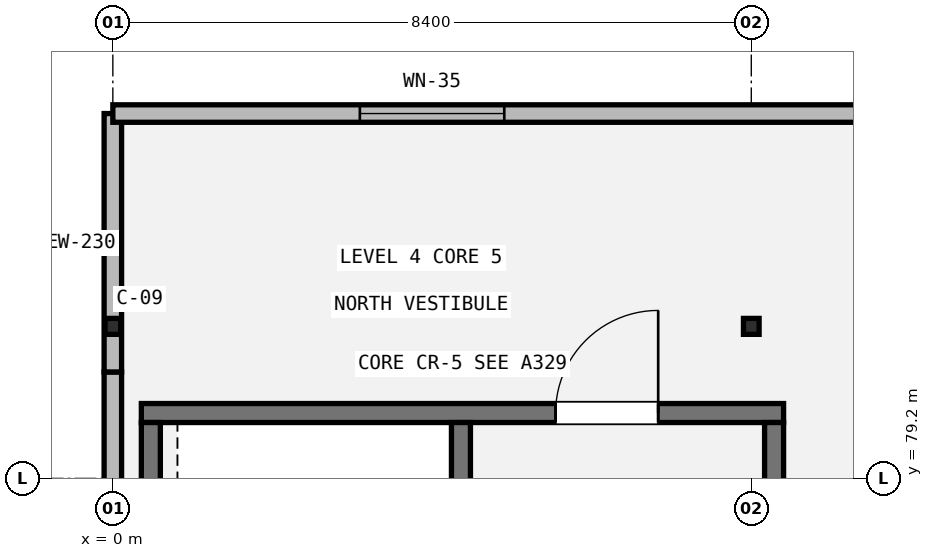
"""IFC4 building model, lengths in metres.
Left out: names, types, materials, properties, quantities, classifications, styles, units other than length and angle.
Written with IfcOpenShell. Run it as: python <this file> out.ifc"""

import sys

from ifc_helpers import new_model, si_unit, direction, frame, frame_2d, origin, origin_2d, place, context, subcontext, project, spatial, rectangle, i_section, extrude, element, fill, save


model = new_model("IFC4")
c1 = context("Model", 3, precision=1e-05, world=origin(), true_north=direction((0.0, 1.0)))
c2 = subcontext(c1, "Body", "Model", "MODEL_VIEW")
j1 = project(units=[si_unit("LENGTHUNIT", "METRE"), si_unit("PLANEANGLEUNIT", "RADIAN")], contexts=[c1])
p1 = place(None, origin())
s1 = spatial("IfcSite", under=j1, at=p1, CompositionType="ELEMENT")
p2 = place(p1, origin())
s2 = spatial("IfcBuilding", under=s1, at=p2, CompositionType="ELEMENT")
p3 = place(p2, frame((0.0, 0.0, 19.2)))
s3 = spatial("IfcBuildingStorey", under=s2, at=p3, CompositionType="ELEMENT", Elevation=19.2)
for number, where, z_axis, x_axis in (
    (1, (0.0, 81.2, 0.0), (0.0, 0.0, 1.0), (1.0, 0.0, 0.0)),
    (2, (8.4, 81.2, 0.0), (0.0, 0.0, 1.0), (1.0, 0.0, 0.0)),
):
    element("IfcColumn", number, at=place(p3, frame(where, z_axis=z_axis, x_axis=x_axis)), inside=s3, PredefinedType="COLUMN", context=c2, shape_type="SweptSolid", body=[
        extrude(i_section(OverallWidth=0.206, OverallDepth=0.21, WebThickness=0.01, FlangeThickness=0.014, FilletRadius=0.01, at=origin_2d()), origin(), (0.0, 0.0, 1.0), 4.2),
    ])
p4 = place(p3, frame((0.0, 69.6, 0.0), z_axis=(0.0, 0.0, 1.0), x_axis=(0.0, 1.0, 0.0)))
e3 = element("IfcWall", 3, at=p4, inside=s3, PredefinedType="STANDARD", context=c2, shape_type="SweptSolid", body=[
    extrude(rectangle(XDim=11.0, YDim=0.23, at=frame_2d((5.5, 0.0))), origin(), (0.0, 0.0, 1.0), 3.952),
])
p5 = place(p3, frame((0.0, 80.6, 0.0), z_axis=(0.0, 0.0, 1.0), x_axis=(0.0, 1.0, 0.0)))
e4 = element("IfcWall", 4, at=p5, inside=s3, PredefinedType="STANDARD", context=c2, shape_type="SweptSolid", body=[
    extrude(rectangle(XDim=3.4, YDim=0.23, at=frame_2d((1.7, 0.0))), origin(), (0.0, 0.0, 1.0), 3.952),
])
p6 = place(p3, frame((0.0, 84.0, 0.0), z_axis=(0.0, 0.0, 1.0), x_axis=(1.0, 0.0, 0.0)))
e5 = element("IfcWall", 5, at=p6, inside=s3, PredefinedType="STANDARD", context=c2, shape_type="SweptSolid", body=[
    extrude(rectangle(XDim=25.2, YDim=0.23, at=frame_2d((12.6, 0.0))), origin(), (0.0, 0.0, 1.0), 3.952),
])
p7 = place(p6, frame((3.25, 0.0, 0.9)))
e6 = element("IfcOpeningElement", 6, at=p7, cuts=e5, PredefinedType="OPENING", context=c2, shape_type="SweptSolid", body=[
    extrude(rectangle(XDim=1.9, YDim=1.65, at=frame_2d((0.95, 0.825))), frame((0.0, 0.125, 0.0), z_axis=(0.0, -1.0, 0.0), x_axis=(1.0, 0.0, 0.0)), (0.0, 0.0, 1.0), 0.25),
])
p8 = place(p6, frame((11.525, 0.0, 0.9)))
e7 = element("IfcOpeningElement", 7, at=p8, cuts=e5, PredefinedType="OPENING", context=c2, shape_type="SweptSolid", body=[
    extrude(rectangle(XDim=2.15, YDim=1.65, at=frame_2d((1.075, 0.825))), frame((0.0, 0.125, 0.0), z_axis=(0.0, -1.0, 0.0), x_axis=(1.0, 0.0, 0.0)), (0.0, 0.0, 1.0), 0.25),
])
p9 = place(p6, frame((19.8, 0.0, 0.9)))
e8 = element("IfcOpeningElement", 8, at=p9, cuts=e5, PredefinedType="OPENING", context=c2, shape_type="SweptSolid", body=[
    extrude(rectangle(XDim=2.4, YDim=1.65, at=frame_2d((1.2, 0.825))), frame((0.0, 0.125, 0.0), z_axis=(0.0, -1.0, 0.0), x_axis=(1.0, 0.0, 0.0)), (0.0, 0.0, 1.0), 0.25),
])
p10 = place(p3, frame((0.375, 80.06, 0.0), z_axis=(0.0, 0.0, 1.0), x_axis=(1.0, 0.0, 0.0)))
e9 = element("IfcWall", 9, at=p10, inside=s3, PredefinedType="SHEAR", context=c2, shape_type="SweptSolid", body=[
    extrude(rectangle(XDim=8.45, YDim=0.25, at=frame_2d((4.225, 0.0))), origin(), (0.0, 0.0, 1.0), 4.0),
])
p11 = place(p10, frame((5.45, 0.0, 0.0)))
e10 = element("IfcOpeningElement", 10, at=p11, cuts=e9, PredefinedType="OPENING", context=c2, shape_type="SweptSolid", body=[
    extrude(rectangle(XDim=1.35, YDim=2.15, at=frame_2d((0.675, 1.075))), frame((0.0, 0.135, 0.0), z_axis=(0.0, -1.0, 0.0), x_axis=(1.0, 0.0, 0.0)), (0.0, 0.0, 1.0), 0.27),
])
for number, where, z_axis, x_axis in (
    (11, (0.5, 69.925, 0.0), (0.0, 0.0, 1.0), (0.0, 1.0, 0.0)),
    (12, (8.7, 79.935, 0.0), (0.0, 0.0, 1.0), (0.0, -1.0, 0.0)),
):
    element("IfcWall", number, at=place(p3, frame(where, z_axis=z_axis, x_axis=x_axis)), inside=s3, PredefinedType="SHEAR", context=c2, shape_type="SweptSolid", body=[
        extrude(rectangle(XDim=10.01, YDim=0.25, at=frame_2d((5.005, 0.0))), origin(), (0.0, 0.0, 1.0), 4.0),
    ])
p12 = place(p3, frame((4.58, 79.935, 0.0), z_axis=(0.0, 0.0, 1.0), x_axis=(0.0, -1.0, 0.0)))
e13 = element("IfcWall", 13, at=p12, inside=s3, PredefinedType="SHEAR", context=c2, shape_type="SweptSolid", body=[
    extrude(rectangle(XDim=10.01, YDim=0.25, at=frame_2d((5.005, 0.0))), origin(), (0.0, 0.0, 1.0), 4.0),
])
p13 = place(p12, frame((8.36, 0.0, 0.0)))
e14 = element("IfcOpeningElement", 14, at=p13, cuts=e13, PredefinedType="OPENING", context=c2, shape_type="SweptSolid", body=[
    extrude(rectangle(XDim=1.1, YDim=2.15, at=frame_2d((0.55, 1.075))), frame((0.0, 0.135, 0.0), z_axis=(0.0, -1.0, 0.0), x_axis=(1.0, 0.0, 0.0)), (0.0, 0.0, 1.0), 0.27),
])
p14 = place(p7, origin())
e15 = element("IfcWindow", 15, at=p14, inside=s3, PartitioningType="SINGLE_PANEL", PredefinedType="WINDOW", context=c2, shape_type="SweptSolid", body=[
    extrude(rectangle(XDim=1.9, YDim=1.65, at=frame_2d((0.95, 0.825))), frame((0.0, 0.03, 0.0), z_axis=(0.0, -1.0, 0.0), x_axis=(1.0, 0.0, 0.0)), (0.0, 0.0, 1.0), 0.06),
])
fill(e6, e15)
p15 = place(p11, origin())
e16 = element("IfcDoor", 16, at=p15, inside=s3, OperationType="SINGLE_SWING_RIGHT", PredefinedType="DOOR", context=c2, shape_type="SweptSolid", body=[
    extrude(rectangle(XDim=1.35, YDim=2.15, at=frame_2d((0.675, 1.075))), frame((0.0, 0.025, 0.0), z_axis=(0.0, -1.0, 0.0), x_axis=(1.0, 0.0, 0.0)), (0.0, 0.0, 1.0), 0.05),
])
fill(e10, e16)
save(model, sys.argv[1])
